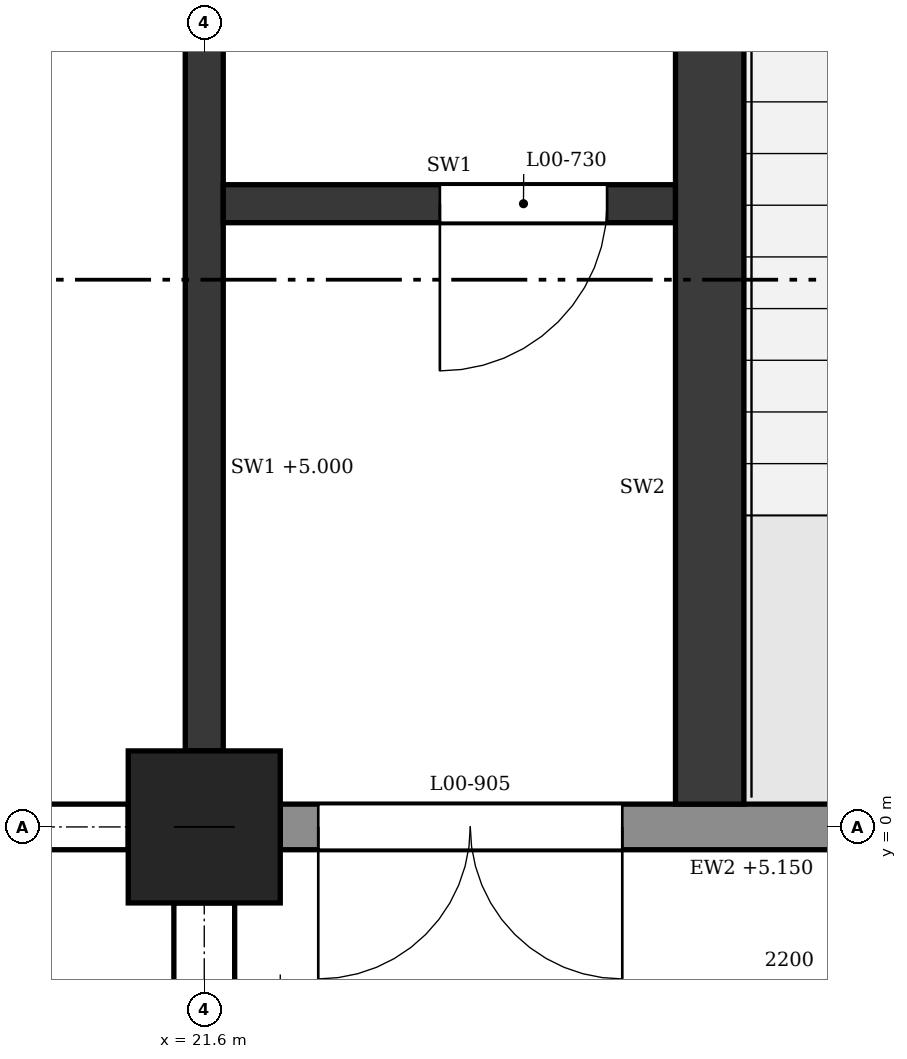
"""IFC4 building model, lengths in metres.
Left out: names, types, materials, properties, quantities, classifications, styles, units other than length and angle.
Written with IfcOpenShell. Run it as: python <this file> out.ifc"""

import sys

from ifc_helpers import new_model, si_unit, direction, frame, frame_2d, origin, origin_2d, place, context, subcontext, project, spatial, polyline, rectangle, outline, extrude, element, fill, save


model = new_model("IFC4")
c1 = context("Model", 3, precision=1e-05, world=origin(), true_north=direction((0.0, 1.0)))
c2 = subcontext(c1, "Body", "Model", "MODEL_VIEW")
j1 = project(units=[si_unit("LENGTHUNIT", "METRE"), si_unit("PLANEANGLEUNIT", "RADIAN")], contexts=[c1])
p1 = place(None, origin())
s1 = spatial("IfcSite", under=j1, at=p1, CompositionType="ELEMENT")
p2 = place(p1, origin())
s2 = spatial("IfcBuilding", under=s1, at=p2, CompositionType="ELEMENT")
p3 = place(p2, origin())
s3 = spatial("IfcBuildingStorey", under=s2, at=p3, CompositionType="ELEMENT", Elevation=0.0)
p4 = place(p3, frame((21.6, 0.0, 0.0), z_axis=(0.0, 0.0, 1.0), x_axis=(1.0, 0.0, 0.0)))
e1 = element("IfcColumn", 1, at=p4, inside=s3, PredefinedType="COLUMN", context=c2, shape_type="SweptSolid", body=[
    extrude(rectangle(XDim=1.0, YDim=1.0, at=origin_2d()), origin(), (0.0, 0.0, 1.0), 6.0),
])
p5 = place(p3, frame((14.9, 0.0, 0.0), z_axis=(0.0, 0.0, 1.0), x_axis=(1.0, 0.0, 0.0)))
e2 = element("IfcWall", 2, at=p5, inside=s3, PredefinedType="STANDARD", context=c2, shape_type="SweptSolid", body=[
    extrude(rectangle(XDim=6.2, YDim=0.3, at=frame_2d((3.1, 0.0))), origin(), (0.0, 0.0, 1.0), 5.15),
])
p6 = place(p5, frame((0.55, 0.0, 0.9)))
e3 = element("IfcOpeningElement", 3, at=p6, cuts=e2, PredefinedType="OPENING", context=c2, shape_type="SweptSolid", body=[
    extrude(outline(polyline([(0.0, 0.0), (1.5, 0.0), (1.5, 3.25), (0.75, 4.0), (0.0, 3.25), (0.0, 0.0)])), frame((0.0, 0.16, 0.0), z_axis=(0.0, -1.0, 0.0), x_axis=(1.0, 0.0, 0.0)), (0.0, 0.0, 1.0), 0.32),
])
p7 = place(p5, frame((4.15, 0.0, 0.9)))
e4 = element("IfcOpeningElement", 4, at=p7, cuts=e2, PredefinedType="OPENING", context=c2, shape_type="SweptSolid", body=[
    extrude(outline(polyline([(0.0, 0.0), (1.5, 0.0), (1.5, 3.25), (0.75, 4.0), (0.0, 3.25), (0.0, 0.0)])), frame((0.0, 0.16, 0.0), z_axis=(0.0, -1.0, 0.0), x_axis=(1.0, 0.0, 0.0)), (0.0, 0.0, 1.0), 0.32),
])
p8 = place(p3, frame((22.1, 0.0, 0.0), z_axis=(0.0, 0.0, 1.0), x_axis=(1.0, 0.0, 0.0)))
e5 = element("IfcWall", 5, at=p8, inside=s3, PredefinedType="STANDARD", context=c2, shape_type="SweptSolid", body=[
    extrude(rectangle(XDim=6.2, YDim=0.3, at=frame_2d((3.1, 0.0))), origin(), (0.0, 0.0, 1.0), 5.15),
])
p9 = place(p8, frame((0.25, 0.0, 0.0)))
e6 = element("IfcOpeningElement", 6, at=p9, cuts=e5, PredefinedType="OPENING", context=c2, shape_type="SweptSolid", body=[
    extrude(rectangle(XDim=2.0, YDim=2.1, at=frame_2d((1.0, 1.05))), frame((0.0, 0.16, 0.0), z_axis=(0.0, -1.0, 0.0), x_axis=(1.0, 0.0, 0.0)), (0.0, 0.0, 1.0), 0.32),
])
p10 = place(p8, frame((4.45, 0.0, 0.9)))
e7 = element("IfcOpeningElement", 7, at=p10, cuts=e5, PredefinedType="OPENING", context=c2, shape_type="SweptSolid", body=[
    extrude(outline(polyline([(0.0, 0.0), (0.9, 0.0), (0.9, 3.55), (0.45, 4.0), (0.0, 3.55), (0.0, 0.0)])), frame((0.0, 0.16, 0.0), z_axis=(0.0, -1.0, 0.0), x_axis=(1.0, 0.0, 0.0)), (0.0, 0.0, 1.0), 0.32),
])
p11 = place(p3, frame((21.6, -0.5, 0.0), z_axis=(0.0, 0.0, 1.0), x_axis=(0.0, -1.0, 0.0)))
e8 = element("IfcWall", 8, at=p11, inside=s3, PredefinedType="POLYGONAL", context=c2, shape_type="SweptSolid", body=[
    extrude(outline(polyline([(1.2, 0.0), (1.2, 20.825), (0.85, 21.35), (0.0, 21.35), (0.0, 0.0), (1.2, 0.0)])), frame((0.0, 0.2, 0.0), z_axis=(0.0, -1.0, 0.0), x_axis=(1.0, 0.0, 0.0)), (0.0, 0.0, 1.0), 0.4),
])
p12 = place(p3, frame((21.6, 0.5, 0.0), z_axis=(0.0, 0.0, 1.0), x_axis=(0.0, 1.0, 0.0)))
e9 = element("IfcWall", 9, at=p12, inside=s3, PredefinedType="SHEAR", context=c2, shape_type="SweptSolid", body=[
    extrude(rectangle(XDim=6.2, YDim=0.25, at=frame_2d((3.1, 0.0))), origin(), (0.0, 0.0, 1.0), 5.0),
])
p13 = place(p3, frame((24.925, 0.15, 0.0), z_axis=(0.0, 0.0, 1.0), x_axis=(0.0, 1.0, 0.0)))
e10 = element("IfcWall", 10, at=p13, inside=s3, PredefinedType="SHEAR", context=c2, shape_type="SweptSolid", body=[
    extrude(rectangle(XDim=6.925, YDim=0.45, at=frame_2d((3.462, 0.0))), origin(), (0.0, 0.0, 1.0), 5.75),
])
p14 = place(p13, frame((5.4, 0.0, 0.0)))
e11 = element("IfcOpeningElement", 11, at=p14, cuts=e10, PredefinedType="OPENING", context=c2, shape_type="SweptSolid", body=[
    extrude(rectangle(XDim=1.0, YDim=2.1, at=frame_2d((0.5, 1.05))), frame((0.0, 0.235, 0.0), z_axis=(0.0, -1.0, 0.0), x_axis=(1.0, 0.0, 0.0)), (0.0, 0.0, 1.0), 0.47),
])
p15 = place(p3, frame((21.725, 4.1, 0.0), z_axis=(0.0, 0.0, 1.0), x_axis=(1.0, 0.0, 0.0)))
e12 = element("IfcWall", 12, at=p15, inside=s3, PredefinedType="SHEAR", context=c2, shape_type="SweptSolid", body=[
    extrude(rectangle(XDim=2.975, YDim=0.25, at=frame_2d((1.487, 0.0))), origin(), (0.0, 0.0, 1.0), 5.75),
])
p16 = place(p15, frame((1.425, 0.0, 0.0)))
e13 = element("IfcOpeningElement", 13, at=p16, cuts=e12, PredefinedType="OPENING", context=c2, shape_type="SweptSolid", body=[
    extrude(rectangle(XDim=1.1, YDim=2.1, at=frame_2d((0.55, 1.05))), frame((0.0, 0.135, 0.0), z_axis=(0.0, -1.0, 0.0), x_axis=(1.0, 0.0, 0.0)), (0.0, 0.0, 1.0), 0.27),
])
p17 = place(p9, frame((2.0, 0.0, 0.0), z_axis=(0.0, 0.0, 1.0), x_axis=(-1.0, 0.0, 0.0)))
e14 = element("IfcDoor", 14, at=p17, inside=s3, OperationType="DOUBLE_DOOR_SINGLE_SWING", PredefinedType="DOOR", context=c2, shape_type="SweptSolid", body=[
    extrude(rectangle(XDim=2.0, YDim=2.1, at=frame_2d((1.0, 1.05))), frame((0.0, 0.025, 0.0), z_axis=(0.0, -1.0, 0.0), x_axis=(1.0, 0.0, 0.0)), (0.0, 0.0, 1.0), 0.05),
])
fill(e6, e14)
p18 = place(p16, frame((1.1, 0.0, 0.0), z_axis=(0.0, 0.0, 1.0), x_axis=(-1.0, 0.0, 0.0)))
e15 = element("IfcDoor", 15, at=p18, inside=s3, OperationType="SINGLE_SWING_RIGHT", PredefinedType="DOOR", context=c2, shape_type="SweptSolid", body=[
    extrude(rectangle(XDim=1.1, YDim=2.1, at=frame_2d((0.55, 1.05))), frame((0.0, 0.025, 0.0), z_axis=(0.0, -1.0, 0.0), x_axis=(1.0, 0.0, 0.0)), (0.0, 0.0, 1.0), 0.05),
])
fill(e13, e15)
save(model, sys.argv[1])
